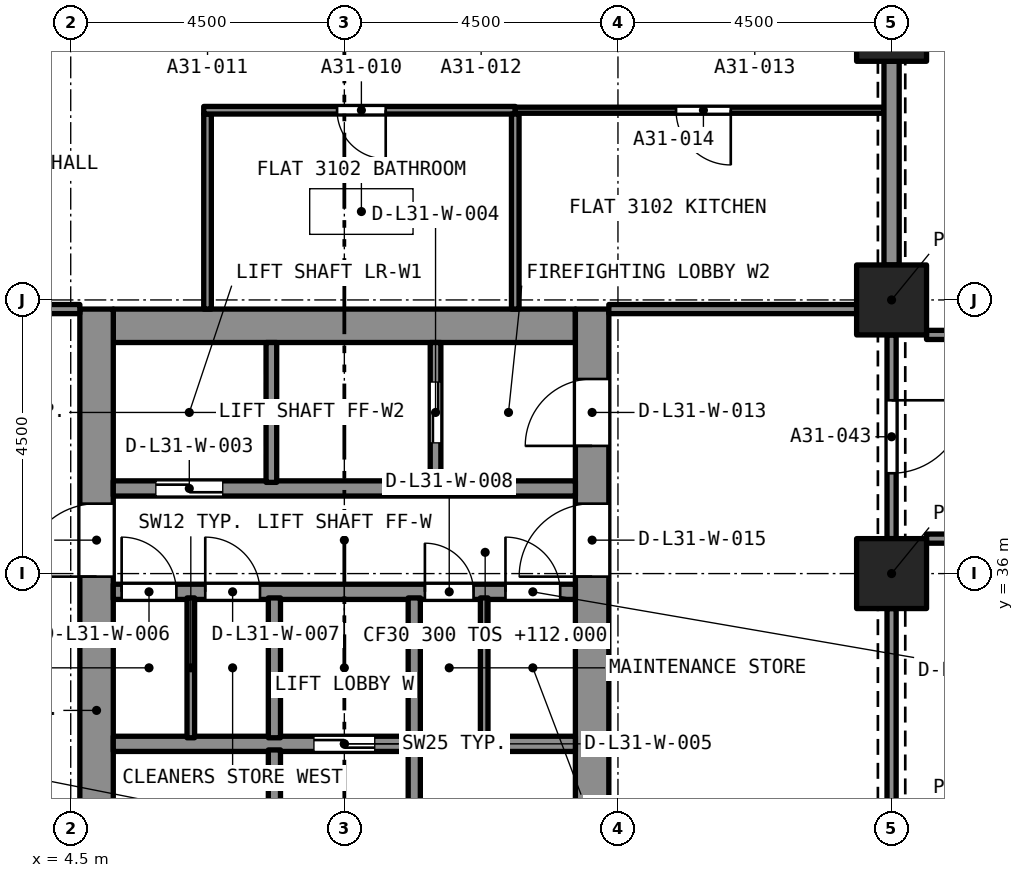
"""IFC4 building model, lengths in metres.
Left out: names, types, materials, properties, quantities, classifications, styles, units other than length and angle.
Written with IfcOpenShell. Run it as: python <this file> out.ifc"""

import sys

from ifc_helpers import new_model, si_unit, direction, frame, frame_2d, origin, origin_2d, place, context, subcontext, project, spatial, rectangle, extrude, element, fill, save


model = new_model("IFC4")
c1 = context("Model", 3, precision=1e-05, world=origin(), true_north=direction((0.0, 1.0)))
c2 = subcontext(c1, "Body", "Model", "MODEL_VIEW")
j1 = project(units=[si_unit("LENGTHUNIT", "METRE"), si_unit("PLANEANGLEUNIT", "RADIAN")], contexts=[c1])
p1 = place(None, origin())
s1 = spatial("IfcSite", under=j1, at=p1, CompositionType="ELEMENT")
p2 = place(p1, origin())
s2 = spatial("IfcBuilding", under=s1, at=p2, CompositionType="ELEMENT")
p3 = place(p2, frame((0.0, 0.0, 112.0)))
s3 = spatial("IfcBuildingStorey", under=s2, at=p3, CompositionType="ELEMENT", Elevation=112.0)
for number, where, z_axis, x_axis in (
    (1, (18.0, 36.0, 0.0), (0.0, 0.0, 1.0), (1.0, 0.0, 0.0)),
    (2, (18.0, 40.5, 0.0), (0.0, 0.0, 1.0), (1.0, 0.0, 0.0)),
    (3, (18.0, 45.0, 0.0), (0.0, 0.0, 1.0), (1.0, 0.0, 0.0)),
):
    element("IfcColumn", number, at=place(p3, frame(where, z_axis=z_axis, x_axis=x_axis)), inside=s3, PredefinedType="COLUMN", context=c2, shape_type="SweptSolid", body=[
        extrude(rectangle(XDim=1.15, YDim=1.15, at=origin_2d()), origin(), (0.0, 0.0, 1.0), 3.2),
    ])
p4 = place(p3, frame((5.2, 40.075, 0.0), z_axis=(0.0, 0.0, 1.0), x_axis=(1.0, 0.0, 0.0)))
e4 = element("IfcWall", 4, at=p4, inside=s3, PredefinedType="SOLIDWALL", context=c2, shape_type="SweptSolid", body=[
    extrude(rectangle(XDim=7.6, YDim=0.55, at=frame_2d((3.8, 0.0))), origin(), (0.0, 0.0, 1.0), 3.2),
])
p5 = place(p3, frame((4.925, 27.15, 0.0), z_axis=(0.0, 0.0, 1.0), x_axis=(0.0, 1.0, 0.0)))
e5 = element("IfcWall", 5, at=p5, inside=s3, PredefinedType="SOLIDWALL", context=c2, shape_type="SweptSolid", body=[
    extrude(rectangle(XDim=13.2, YDim=0.55, at=frame_2d((6.6, 0.0))), origin(), (0.0, 0.0, 1.0), 3.2),
])
p6 = place(p5, frame((8.8, 0.0, 0.0)))
e6 = element("IfcOpeningElement", 6, at=p6, cuts=e5, PredefinedType="OPENING", context=c2, shape_type="SweptSolid", body=[
    extrude(rectangle(XDim=1.2, YDim=2.1, at=frame_2d((0.6, 1.05))), frame((0.0, 0.285, 0.0), z_axis=(0.0, -1.0, 0.0), x_axis=(1.0, 0.0, 0.0)), (0.0, 0.0, 1.0), 0.57),
])
p7 = place(p3, frame((13.075, 27.15, 0.0), z_axis=(0.0, 0.0, 1.0), x_axis=(0.0, 1.0, 0.0)))
e7 = element("IfcWall", 7, at=p7, inside=s3, PredefinedType="SOLIDWALL", context=c2, shape_type="SweptSolid", body=[
    extrude(rectangle(XDim=13.2, YDim=0.55, at=frame_2d((6.6, 0.0))), origin(), (0.0, 0.0, 1.0), 3.2),
])
p8 = place(p7, frame((10.95, 0.0, 0.0)))
e8 = element("IfcOpeningElement", 8, at=p8, cuts=e7, PredefinedType="OPENING", context=c2, shape_type="SweptSolid", body=[
    extrude(rectangle(XDim=1.1, YDim=2.1, at=frame_2d((0.55, 1.05))), frame((0.0, 0.285, 0.0), z_axis=(0.0, -1.0, 0.0), x_axis=(1.0, 0.0, 0.0)), (0.0, 0.0, 1.0), 0.57),
])
p9 = place(p7, frame((8.8, 0.0, 0.0)))
e9 = element("IfcOpeningElement", 9, at=p9, cuts=e7, PredefinedType="OPENING", context=c2, shape_type="SweptSolid", body=[
    extrude(rectangle(XDim=1.2, YDim=2.1, at=frame_2d((0.6, 1.05))), frame((0.0, 0.285, 0.0), z_axis=(0.0, -1.0, 0.0), x_axis=(1.0, 0.0, 0.0)), (0.0, 0.0, 1.0), 0.57),
])
p10 = place(p3, frame((6.75, 40.35, 0.0), z_axis=(0.0, 0.0, 1.0), x_axis=(0.0, 1.0, 0.0)))
e10 = element("IfcWall", 10, at=p10, inside=s3, PredefinedType="PARTITIONING", context=c2, shape_type="SweptSolid", body=[
    extrude(rectangle(XDim=3.208, YDim=0.125, at=frame_2d((1.604, 0.0))), origin(), (0.0, 0.0, 1.0), 2.9),
])
p11 = place(p3, frame((11.811, 43.62, 0.0), z_axis=(0.0, 0.0, 1.0), x_axis=(-1.0, 0.0, 0.0)))
e11 = element("IfcWall", 11, at=p11, inside=s3, PredefinedType="PARTITIONING", context=c2, shape_type="SweptSolid", body=[
    extrude(rectangle(XDim=5.123, YDim=0.125, at=frame_2d((2.562, 0.0))), origin(), (0.0, 0.0, 1.0), 2.9),
])
p12 = place(p11, frame((2.13, 0.0, 0.0)))
e12 = element("IfcOpeningElement", 12, at=p12, cuts=e11, PredefinedType="OPENING", context=c2, shape_type="SweptSolid", body=[
    extrude(rectangle(XDim=0.8, YDim=2.1, at=frame_2d((0.4, 1.05))), frame((0.0, 0.073, 0.0), z_axis=(0.0, -1.0, 0.0), x_axis=(1.0, 0.0, 0.0)), (0.0, 0.0, 1.0), 0.145),
])
p13 = place(p3, frame((11.811, 40.35, 0.0), z_axis=(0.0, 0.0, 1.0), x_axis=(0.0, 1.0, 0.0)))
e13 = element("IfcWall", 13, at=p13, inside=s3, PredefinedType="PARTITIONING", context=c2, shape_type="SweptSolid", body=[
    extrude(rectangle(XDim=3.208, YDim=0.125, at=frame_2d((1.604, 0.0))), origin(), (0.0, 0.0, 1.0), 2.9),
])
p14 = place(p3, frame((17.875, 43.62, 0.0), z_axis=(0.0, 0.0, 1.0), x_axis=(-1.0, 0.0, 0.0)))
e14 = element("IfcWall", 14, at=p14, inside=s3, PredefinedType="PARTITIONING", context=c2, shape_type="SweptSolid", body=[
    extrude(rectangle(XDim=6.064, YDim=0.1, at=frame_2d((3.032, 0.0))), origin(), (0.0, 0.0, 1.0), 2.9),
])
p15 = place(p14, frame((2.52, 0.0, 0.0)))
e15 = element("IfcOpeningElement", 15, at=p15, cuts=e14, PredefinedType="OPENING", context=c2, shape_type="SweptSolid", body=[
    extrude(rectangle(XDim=0.9, YDim=2.1, at=frame_2d((0.45, 1.05))), frame((0.0, 0.06, 0.0), z_axis=(0.0, -1.0, 0.0), x_axis=(1.0, 0.0, 0.0)), (0.0, 0.0, 1.0), 0.12),
])
p16 = place(p3, frame((0.575, 40.35, 0.0), z_axis=(0.0, 0.0, 1.0), x_axis=(1.0, 0.0, 0.0)))
e16 = element("IfcWall", 16, at=p16, inside=s3, PredefinedType="PARTITIONING", context=c2, shape_type="SweptSolid", body=[
    extrude(rectangle(XDim=4.075, YDim=0.15, at=frame_2d((2.038, 0.0))), origin(), (0.0, 0.0, 1.0), 2.9),
])
p17 = place(p16, frame((1.175, 0.0, 0.0)))
e17 = element("IfcOpeningElement", 17, at=p17, cuts=e16, PredefinedType="OPENING", context=c2, shape_type="SweptSolid", body=[
    extrude(rectangle(XDim=1.0, YDim=2.1, at=frame_2d((0.5, 1.05))), frame((0.0, 0.085, 0.0), z_axis=(0.0, -1.0, 0.0), x_axis=(1.0, 0.0, 0.0)), (0.0, 0.0, 1.0), 0.17),
])
p18 = place(p3, frame((18.0, 41.075, 0.0), z_axis=(0.0, 0.0, 1.0), x_axis=(0.0, 1.0, 0.0)))
e18 = element("IfcWall", 18, at=p18, inside=s3, PredefinedType="PARTITIONING", context=c2, shape_type="SweptSolid", body=[
    extrude(rectangle(XDim=3.35, YDim=0.25, at=frame_2d((1.675, 0.0))), origin(), (0.0, 0.0, 1.0), 2.38),
])
p19 = place(p3, frame((13.35, 40.35, 0.0), z_axis=(0.0, 0.0, 1.0), x_axis=(1.0, 0.0, 0.0)))
e19 = element("IfcWall", 19, at=p19, inside=s3, PredefinedType="PARTITIONING", context=c2, shape_type="SweptSolid", body=[
    extrude(rectangle(XDim=4.075, YDim=0.15, at=frame_2d((2.038, 0.0))), origin(), (0.0, 0.0, 1.0), 2.9),
])
p20 = place(p3, frame((18.575, 39.925, 0.0), z_axis=(0.0, 0.0, 1.0), x_axis=(1.0, 0.0, 0.0)))
e20 = element("IfcWall", 20, at=p20, inside=s3, PredefinedType="PARTITIONING", context=c2, shape_type="SweptSolid", body=[
    extrude(rectangle(XDim=8.425, YDim=0.15, at=frame_2d((4.212, 0.0))), origin(), (0.0, 0.0, 1.0), 2.75),
])
p21 = place(p20, frame((3.425, 0.0, 0.0)))
e21 = element("IfcOpeningElement", 21, at=p21, cuts=e20, PredefinedType="OPENING", context=c2, shape_type="SweptSolid", body=[
    extrude(rectangle(XDim=1.0, YDim=2.1, at=frame_2d((0.5, 1.05))), frame((0.0, 0.085, 0.0), z_axis=(0.0, -1.0, 0.0), x_axis=(1.0, 0.0, 0.0)), (0.0, 0.0, 1.0), 0.17),
])
p22 = place(p3, frame((30.925, 36.575, 0.0), z_axis=(0.0, 0.0, 1.0), x_axis=(-1.0, 0.0, 0.0)))
e22 = element("IfcWall", 22, at=p22, inside=s3, PredefinedType="PARTITIONING", context=c2, shape_type="SweptSolid", body=[
    extrude(rectangle(XDim=12.35, YDim=0.15, at=frame_2d((6.175, 0.0))), origin(), (0.0, 0.0, 1.0), 2.75),
])
p23 = place(p22, frame((5.675, 0.0, 0.0)))
e23 = element("IfcOpeningElement", 23, at=p23, cuts=e22, PredefinedType="OPENING", context=c2, shape_type="SweptSolid", body=[
    extrude(rectangle(XDim=1.0, YDim=2.1, at=frame_2d((0.5, 1.05))), frame((0.0, 0.085, 0.0), z_axis=(0.0, -1.0, 0.0), x_axis=(1.0, 0.0, 0.0)), (0.0, 0.0, 1.0), 0.17),
])
p24 = place(p3, frame((18.0, 39.925, 0.0), z_axis=(0.0, 0.0, 1.0), x_axis=(0.0, -1.0, 0.0)))
e24 = element("IfcWall", 24, at=p24, inside=s3, PredefinedType="PARTITIONING", context=c2, shape_type="SweptSolid", body=[
    extrude(rectangle(XDim=3.35, YDim=0.15, at=frame_2d((1.675, 0.0))), origin(), (0.0, 0.0, 1.0), 2.38),
])
p25 = place(p24, frame((1.075, 0.0, 0.0)))
e25 = element("IfcOpeningElement", 25, at=p25, cuts=e24, PredefinedType="OPENING", context=c2, shape_type="SweptSolid", body=[
    extrude(rectangle(XDim=1.2, YDim=2.1, at=frame_2d((0.6, 1.05))), frame((0.0, 0.085, 0.0), z_axis=(0.0, -1.0, 0.0), x_axis=(1.0, 0.0, 0.0)), (0.0, 0.0, 1.0), 0.17),
])
p26 = place(p3, frame((18.0, 32.075, 0.0), z_axis=(0.0, 0.0, 1.0), x_axis=(0.0, 1.0, 0.0)))
e26 = element("IfcWall", 26, at=p26, inside=s3, PredefinedType="PARTITIONING", context=c2, shape_type="SweptSolid", body=[
    extrude(rectangle(XDim=3.35, YDim=0.15, at=frame_2d((1.675, 0.0))), origin(), (0.0, 0.0, 1.0), 2.38),
])
p27 = place(p3, frame((5.2, 33.2, 0.0), z_axis=(0.0, 0.0, 1.0), x_axis=(1.0, 0.0, 0.0)))
e27 = element("IfcWall", 27, at=p27, inside=s3, PredefinedType="SOLIDWALL", context=c2, shape_type="SweptSolid", body=[
    extrude(rectangle(XDim=7.6, YDim=0.25, at=frame_2d((3.8, 0.0))), origin(), (0.0, 0.0, 1.0), 2.9),
])
p28 = place(p27, frame((3.3, 0.0, 0.0)))
e28 = element("IfcOpeningElement", 28, at=p28, cuts=e27, PredefinedType="OPENING", context=c2, shape_type="SweptSolid", body=[
    extrude(rectangle(XDim=1.0, YDim=2.1, at=frame_2d((0.5, 1.05))), frame((0.0, 0.135, 0.0), z_axis=(0.0, -1.0, 0.0), x_axis=(1.0, 0.0, 0.0)), (0.0, 0.0, 1.0), 0.27),
])
p29 = place(p3, frame((5.2, 35.7, 0.0), z_axis=(0.0, 0.0, 1.0), x_axis=(1.0, 0.0, 0.0)))
e29 = element("IfcWall", 29, at=p29, inside=s3, PredefinedType="SOLIDWALL", context=c2, shape_type="SweptSolid", body=[
    extrude(rectangle(XDim=7.6, YDim=0.25, at=frame_2d((3.8, 0.0))), origin(), (0.0, 0.0, 1.0), 2.9),
])
p30 = place(p29, frame((0.137, 0.0, 0.0)))
e30 = element("IfcOpeningElement", 30, at=p30, cuts=e29, PredefinedType="OPENING", context=c2, shape_type="SweptSolid", body=[
    extrude(rectangle(XDim=0.9, YDim=2.1, at=frame_2d((0.45, 1.05))), frame((0.0, 0.135, 0.0), z_axis=(0.0, -1.0, 0.0), x_axis=(1.0, 0.0, 0.0)), (0.0, 0.0, 1.0), 0.27),
])
p31 = place(p29, frame((1.512, 0.0, 0.0)))
e31 = element("IfcOpeningElement", 31, at=p31, cuts=e29, PredefinedType="OPENING", context=c2, shape_type="SweptSolid", body=[
    extrude(rectangle(XDim=0.9, YDim=2.1, at=frame_2d((0.45, 1.05))), frame((0.0, 0.135, 0.0), z_axis=(0.0, -1.0, 0.0), x_axis=(1.0, 0.0, 0.0)), (0.0, 0.0, 1.0), 0.27),
])
p32 = place(p29, frame((5.125, 0.0, 0.0)))
e32 = element("IfcOpeningElement", 32, at=p32, cuts=e29, PredefinedType="OPENING", context=c2, shape_type="SweptSolid", body=[
    extrude(rectangle(XDim=0.8, YDim=2.1, at=frame_2d((0.4, 1.05))), frame((0.0, 0.135, 0.0), z_axis=(0.0, -1.0, 0.0), x_axis=(1.0, 0.0, 0.0)), (0.0, 0.0, 1.0), 0.27),
])
p33 = place(p29, frame((6.45, 0.0, 0.0)))
e33 = element("IfcOpeningElement", 33, at=p33, cuts=e29, PredefinedType="OPENING", context=c2, shape_type="SweptSolid", body=[
    extrude(rectangle(XDim=0.9, YDim=2.1, at=frame_2d((0.45, 1.05))), frame((0.0, 0.135, 0.0), z_axis=(0.0, -1.0, 0.0), x_axis=(1.0, 0.0, 0.0)), (0.0, 0.0, 1.0), 0.27),
])
p34 = place(p3, frame((5.2, 37.4, 0.0), z_axis=(0.0, 0.0, 1.0), x_axis=(1.0, 0.0, 0.0)))
e34 = element("IfcWall", 34, at=p34, inside=s3, PredefinedType="SOLIDWALL", context=c2, shape_type="SweptSolid", body=[
    extrude(rectangle(XDim=7.6, YDim=0.25, at=frame_2d((3.8, 0.0))), origin(), (0.0, 0.0, 1.0), 2.9),
])
p35 = place(p34, frame((0.7, 0.0, 0.0)))
e35 = element("IfcOpeningElement", 35, at=p35, cuts=e34, PredefinedType="OPENING", context=c2, shape_type="SweptSolid", body=[
    extrude(rectangle(XDim=1.1, YDim=2.4, at=frame_2d((0.55, 1.2))), frame((0.0, 0.135, 0.0), z_axis=(0.0, -1.0, 0.0), x_axis=(1.0, 0.0, 0.0)), (0.0, 0.0, 1.0), 0.27),
])
p36 = place(p3, frame((7.85, 27.7, 0.0), z_axis=(0.0, 0.0, 1.0), x_axis=(0.0, 1.0, 0.0)))
e36 = element("IfcWall", 36, at=p36, inside=s3, PredefinedType="SOLIDWALL", context=c2, shape_type="SweptSolid", body=[
    extrude(rectangle(XDim=5.4, YDim=0.2, at=frame_2d((2.7, 0.0))), origin(), (0.0, 0.0, 1.0), 2.9),
])
p37 = place(p36, frame((0.2, 0.0, 0.0)))
e37 = element("IfcOpeningElement", 37, at=p37, cuts=e36, PredefinedType="OPENING", context=c2, shape_type="SweptSolid", body=[
    extrude(rectangle(XDim=0.9, YDim=2.1, at=frame_2d((0.45, 1.05))), frame((0.0, 0.11, 0.0), z_axis=(0.0, -1.0, 0.0), x_axis=(1.0, 0.0, 0.0)), (0.0, 0.0, 1.0), 0.22),
])
p38 = place(p3, frame((10.15, 27.7, 0.0), z_axis=(0.0, 0.0, 1.0), x_axis=(0.0, 1.0, 0.0)))
e38 = element("IfcWall", 38, at=p38, inside=s3, PredefinedType="SOLIDWALL", context=c2, shape_type="SweptSolid", body=[
    extrude(rectangle(XDim=5.4, YDim=0.2, at=frame_2d((2.7, 0.0))), origin(), (0.0, 0.0, 1.0), 2.9),
])
p39 = place(p38, frame((0.2, 0.0, 0.0)))
e39 = element("IfcOpeningElement", 39, at=p39, cuts=e38, PredefinedType="OPENING", context=c2, shape_type="SweptSolid", body=[
    extrude(rectangle(XDim=0.9, YDim=2.1, at=frame_2d((0.45, 1.05))), frame((0.0, 0.11, 0.0), z_axis=(0.0, -1.0, 0.0), x_axis=(1.0, 0.0, 0.0)), (0.0, 0.0, 1.0), 0.22),
])
for number, where, z_axis, x_axis in (
    (40, (7.85, 33.3, 0.0), (0.0, 0.0, 1.0), (0.0, 1.0, 0.0)),
    (41, (10.15, 33.3, 0.0), (0.0, 0.0, 1.0), (0.0, 1.0, 0.0)),
):
    element("IfcWall", number, at=place(p3, frame(where, z_axis=z_axis, x_axis=x_axis)), inside=s3, PredefinedType="SOLIDWALL", context=c2, shape_type="SweptSolid", body=[
        extrude(rectangle(XDim=2.3, YDim=0.2, at=frame_2d((1.15, 0.0))), origin(), (0.0, 0.0, 1.0), 2.9),
    ])
p40 = place(p3, frame((7.8, 37.5, 0.0), z_axis=(0.0, 0.0, 1.0), x_axis=(0.0, 1.0, 0.0)))
e42 = element("IfcWall", 42, at=p40, inside=s3, PredefinedType="SOLIDWALL", context=c2, shape_type="SweptSolid", body=[
    extrude(rectangle(XDim=2.3, YDim=0.175, at=frame_2d((1.15, 0.0))), origin(), (0.0, 0.0, 1.0), 2.9),
])
p41 = place(p3, frame((10.5, 37.5, 0.0), z_axis=(0.0, 0.0, 1.0), x_axis=(0.0, 1.0, 0.0)))
e43 = element("IfcWall", 43, at=p41, inside=s3, PredefinedType="SOLIDWALL", context=c2, shape_type="SweptSolid", body=[
    extrude(rectangle(XDim=2.3, YDim=0.175, at=frame_2d((1.15, 0.0))), origin(), (0.0, 0.0, 1.0), 2.9),
])
p42 = place(p41, frame((0.65, 0.0, 0.0)))
e44 = element("IfcOpeningElement", 44, at=p42, cuts=e43, PredefinedType="OPENING", context=c2, shape_type="SweptSolid", body=[
    extrude(rectangle(XDim=1.0, YDim=2.1, at=frame_2d((0.5, 1.05))), frame((0.0, 0.097, 0.0), z_axis=(0.0, -1.0, 0.0), x_axis=(1.0, 0.0, 0.0)), (0.0, 0.0, 1.0), 0.195),
])
for number, where, z_axis, x_axis in (
    (45, (6.475, 33.3, 0.0), (0.0, 0.0, 1.0), (0.0, 1.0, 0.0)),
    (46, (11.3, 33.3, 0.0), (0.0, 0.0, 1.0), (0.0, 1.0, 0.0)),
):
    element("IfcWall", number, at=place(p3, frame(where, z_axis=z_axis, x_axis=x_axis)), inside=s3, PredefinedType="PARTITIONING", context=c2, shape_type="SweptSolid", body=[
        extrude(rectangle(XDim=2.3, YDim=0.125, at=frame_2d((1.15, 0.0))), origin(), (0.0, 0.0, 1.0), 2.9),
    ])
p43 = place(p12, origin())
e47 = element("IfcDoor", 47, at=p43, inside=s3, OperationType="SINGLE_SWING_LEFT", PredefinedType="DOOR", context=c2, shape_type="SweptSolid", body=[
    extrude(rectangle(XDim=0.8, YDim=2.1, at=frame_2d((0.4, 1.05))), frame((0.0, 0.025, 0.0), z_axis=(0.0, -1.0, 0.0), x_axis=(1.0, 0.0, 0.0)), (0.0, 0.0, 1.0), 0.05),
])
fill(e12, e47)
p44 = place(p15, origin())
e48 = element("IfcDoor", 48, at=p44, inside=s3, OperationType="SINGLE_SWING_LEFT", PredefinedType="DOOR", context=c2, shape_type="SweptSolid", body=[
    extrude(rectangle(XDim=0.9, YDim=2.1, at=frame_2d((0.45, 1.05))), frame((0.0, 0.025, 0.0), z_axis=(0.0, -1.0, 0.0), x_axis=(1.0, 0.0, 0.0)), (0.0, 0.0, 1.0), 0.05),
])
fill(e15, e48)
p45 = place(p25, origin())
e49 = element("IfcDoor", 49, at=p45, inside=s3, OperationType="SINGLE_SWING_LEFT", PredefinedType="DOOR", context=c2, shape_type="SweptSolid", body=[
    extrude(rectangle(XDim=1.2, YDim=2.1, at=frame_2d((0.6, 1.05))), frame((0.0, 0.025, 0.0), z_axis=(0.0, -1.0, 0.0), x_axis=(1.0, 0.0, 0.0)), (0.0, 0.0, 1.0), 0.05),
])
fill(e25, e49)
p46 = place(p35, origin())
e50 = element("IfcDoor", 50, at=p46, inside=s3, OperationType="SLIDING_TO_LEFT", PredefinedType="DOOR", context=c2, shape_type="SweptSolid", body=[
    extrude(rectangle(XDim=1.1, YDim=2.4, at=frame_2d((0.55, 1.2))), frame((0.0, 0.025, 0.0), z_axis=(0.0, -1.0, 0.0), x_axis=(1.0, 0.0, 0.0)), (0.0, 0.0, 1.0), 0.05),
])
fill(e35, e50)
p47 = place(p42, origin())
e51 = element("IfcDoor", 51, at=p47, inside=s3, OperationType="SLIDING_TO_LEFT", PredefinedType="DOOR", context=c2, shape_type="SweptSolid", body=[
    extrude(rectangle(XDim=1.0, YDim=2.1, at=frame_2d((0.5, 1.05))), frame((0.0, 0.025, 0.0), z_axis=(0.0, -1.0, 0.0), x_axis=(1.0, 0.0, 0.0)), (0.0, 0.0, 1.0), 0.05),
])
fill(e44, e51)
p48 = place(p28, origin())
e52 = element("IfcDoor", 52, at=p48, inside=s3, OperationType="SLIDING_TO_LEFT", PredefinedType="DOOR", context=c2, shape_type="SweptSolid", body=[
    extrude(rectangle(XDim=1.0, YDim=2.1, at=frame_2d((0.5, 1.05))), frame((0.0, 0.025, 0.0), z_axis=(0.0, -1.0, 0.0), x_axis=(1.0, 0.0, 0.0)), (0.0, 0.0, 1.0), 0.05),
])
fill(e28, e52)
p49 = place(p30, origin())
e53 = element("IfcDoor", 53, at=p49, inside=s3, OperationType="SINGLE_SWING_LEFT", PredefinedType="DOOR", context=c2, shape_type="SweptSolid", body=[
    extrude(rectangle(XDim=0.9, YDim=2.1, at=frame_2d((0.45, 1.05))), frame((0.0, 0.025, 0.0), z_axis=(0.0, -1.0, 0.0), x_axis=(1.0, 0.0, 0.0)), (0.0, 0.0, 1.0), 0.05),
])
fill(e30, e53)
p50 = place(p31, origin())
e54 = element("IfcDoor", 54, at=p50, inside=s3, OperationType="SINGLE_SWING_LEFT", PredefinedType="DOOR", context=c2, shape_type="SweptSolid", body=[
    extrude(rectangle(XDim=0.9, YDim=2.1, at=frame_2d((0.45, 1.05))), frame((0.0, 0.025, 0.0), z_axis=(0.0, -1.0, 0.0), x_axis=(1.0, 0.0, 0.0)), (0.0, 0.0, 1.0), 0.05),
])
fill(e31, e54)
p51 = place(p32, origin())
e55 = element("IfcDoor", 55, at=p51, inside=s3, OperationType="SINGLE_SWING_LEFT", PredefinedType="DOOR", context=c2, shape_type="SweptSolid", body=[
    extrude(rectangle(XDim=0.8, YDim=2.1, at=frame_2d((0.4, 1.05))), frame((0.0, 0.025, 0.0), z_axis=(0.0, -1.0, 0.0), x_axis=(1.0, 0.0, 0.0)), (0.0, 0.0, 1.0), 0.05),
])
fill(e32, e55)
p52 = place(p33, origin())
e56 = element("IfcDoor", 56, at=p52, inside=s3, OperationType="SINGLE_SWING_LEFT", PredefinedType="DOOR", context=c2, shape_type="SweptSolid", body=[
    extrude(rectangle(XDim=0.9, YDim=2.1, at=frame_2d((0.45, 1.05))), frame((0.0, 0.025, 0.0), z_axis=(0.0, -1.0, 0.0), x_axis=(1.0, 0.0, 0.0)), (0.0, 0.0, 1.0), 0.05),
])
fill(e33, e56)
p53 = place(p8, origin())
e57 = element("IfcDoor", 57, at=p53, inside=s3, OperationType="SINGLE_SWING_LEFT", PredefinedType="DOOR", context=c2, shape_type="SweptSolid", body=[
    extrude(rectangle(XDim=1.1, YDim=2.1, at=frame_2d((0.55, 1.05))), frame((0.0, 0.025, 0.0), z_axis=(0.0, -1.0, 0.0), x_axis=(1.0, 0.0, 0.0)), (0.0, 0.0, 1.0), 0.05),
])
fill(e8, e57)
p54 = place(p6, origin())
e58 = element("IfcDoor", 58, at=p54, inside=s3, OperationType="SINGLE_SWING_LEFT", PredefinedType="DOOR", context=c2, shape_type="SweptSolid", body=[
    extrude(rectangle(XDim=1.2, YDim=2.1, at=frame_2d((0.6, 1.05))), frame((0.0, 0.025, 0.0), z_axis=(0.0, -1.0, 0.0), x_axis=(1.0, 0.0, 0.0)), (0.0, 0.0, 1.0), 0.05),
])
fill(e6, e58)
p55 = place(p9, origin())
e59 = element("IfcDoor", 59, at=p55, inside=s3, OperationType="SINGLE_SWING_LEFT", PredefinedType="DOOR", context=c2, shape_type="SweptSolid", body=[
    extrude(rectangle(XDim=1.2, YDim=2.1, at=frame_2d((0.6, 1.05))), frame((0.0, 0.025, 0.0), z_axis=(0.0, -1.0, 0.0), x_axis=(1.0, 0.0, 0.0)), (0.0, 0.0, 1.0), 0.05),
])
fill(e9, e59)
save(model, sys.argv[1])
